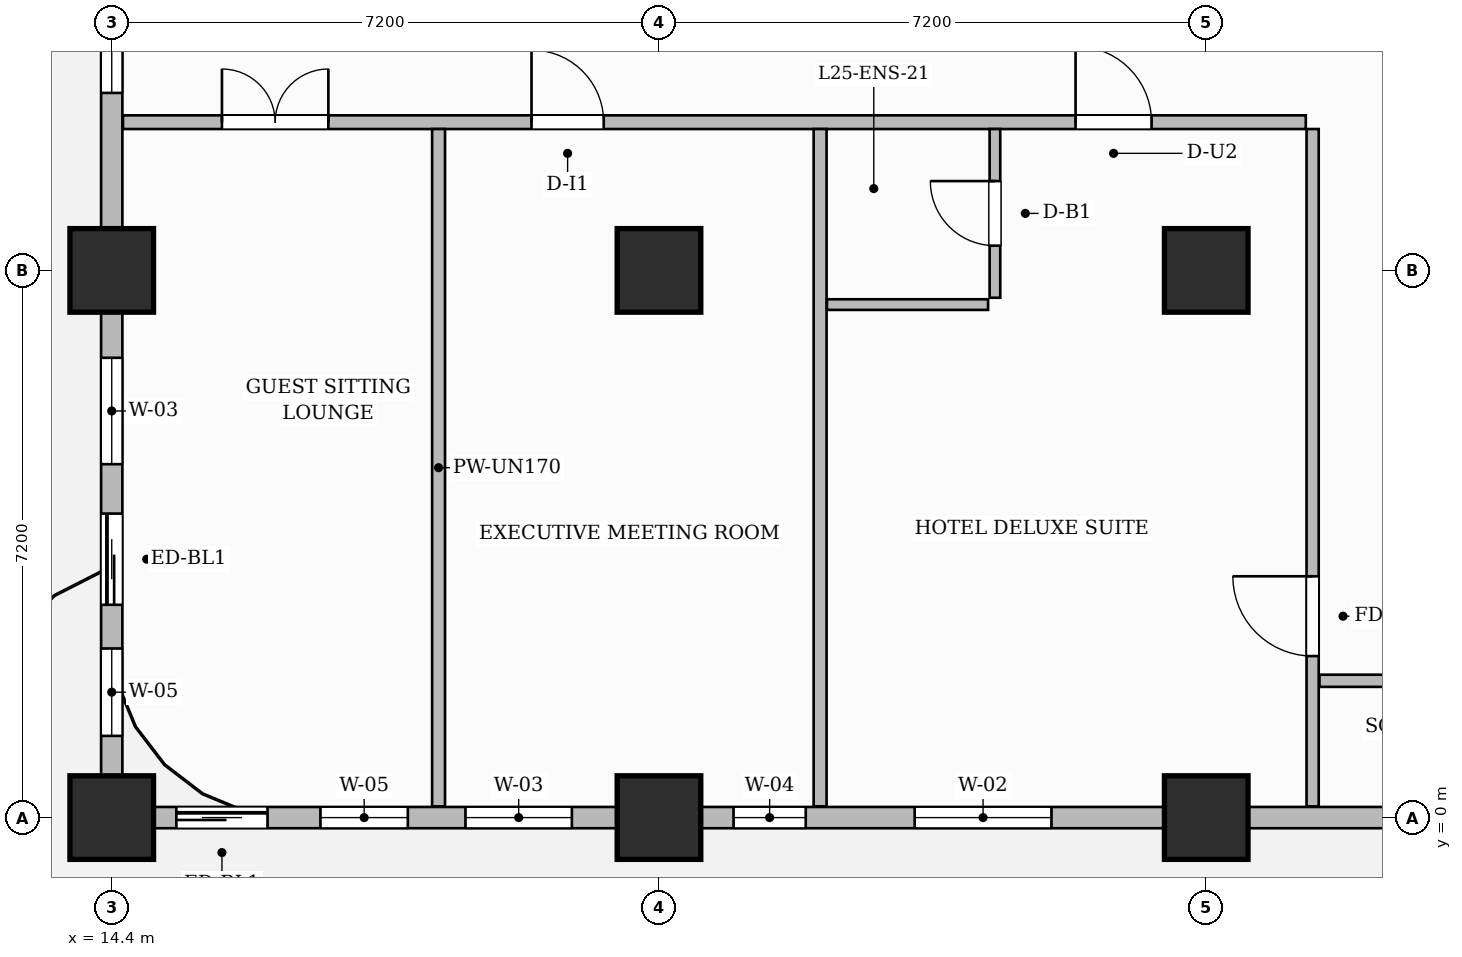
"""IFC4 building model, lengths in metres.
Left out: names, types, materials, properties, quantities, classifications, styles, units other than length and angle.
Written with IfcOpenShell. Run it as: python <this file> out.ifc"""

import sys

from ifc_helpers import new_model, si_unit, direction, frame, frame_2d, origin, origin_2d, place, context, subcontext, project, spatial, rectangle, extrude, source, transform, mapped, element, fill, save


model = new_model("IFC4")
c1 = context("Model", 3, precision=1e-05, world=origin(), true_north=direction((0.0, 1.0)))
c2 = subcontext(c1, "Body", "Model", "MODEL_VIEW")
j1 = project(units=[si_unit("LENGTHUNIT", "METRE"), si_unit("PLANEANGLEUNIT", "RADIAN")], contexts=[c1])
p1 = place(None, origin())
s1 = spatial("IfcSite", under=j1, at=p1, CompositionType="ELEMENT")
p2 = place(p1, origin())
s2 = spatial("IfcBuilding", under=s1, at=p2, CompositionType="ELEMENT")
p3 = place(p2, frame((0.0, 0.0, 102.7)))
s3 = spatial("IfcBuildingStorey", under=s2, at=p3, CompositionType="ELEMENT", Elevation=102.7)
m1 = source(origin(), c2, "Body", "SweptSolid", [
    extrude(rectangle(XDim=1.1, YDim=1.1, at=origin_2d()), origin(), (0.0, 0.0, 1.0), 3.7),
])
for number, where, z_axis, x_axis in (
    (1, (14.4, 0.0, 0.0), (0.0, 0.0, 1.0), (1.0, 0.0, 0.0)),
    (2, (14.4, 7.2, 0.0), (0.0, 0.0, 1.0), (1.0, 0.0, 0.0)),
    (3, (21.6, 0.0, 0.0), (0.0, 0.0, 1.0), (1.0, 0.0, 0.0)),
    (4, (21.6, 7.2, 0.0), (0.0, 0.0, 1.0), (1.0, 0.0, 0.0)),
    (5, (28.8, 0.0, 0.0), (0.0, 0.0, 1.0), (1.0, 0.0, 0.0)),
    (6, (28.8, 7.2, 0.0), (0.0, 0.0, 1.0), (1.0, 0.0, 0.0)),
):
    element("IfcColumn", number, at=place(p3, frame(where, z_axis=z_axis, x_axis=x_axis)), inside=s3, PredefinedType="COLUMN", context=c2, shape_type="MappedRepresentation", body=[
        mapped(m1, transform((0.0, 0.0, 0.0), scale=1.0)),
    ])
p4 = place(p3, frame((14.548, 9.15, 0.0), z_axis=(0.0, 0.0, 1.0), x_axis=(1.0, 0.0, 0.0)))
e7 = element("IfcWall", 7, at=p4, inside=s3, PredefinedType="PARTITIONING", context=c2, shape_type="SweptSolid", body=[
    extrude(rectangle(XDim=15.562, YDim=0.18, at=frame_2d((7.781, 0.0))), origin(), (0.0, 0.0, 1.0), 3.4),
])
p5 = place(p4, frame((1.302, 0.0, 0.0)))
e8 = element("IfcOpeningElement", 8, at=p5, cuts=e7, PredefinedType="OPENING", context=c2, shape_type="SweptSolid", body=[
    extrude(rectangle(XDim=1.4, YDim=2.35, at=frame_2d((0.7, 1.175))), frame((0.0, 0.1, 0.0), z_axis=(0.0, -1.0, 0.0), x_axis=(1.0, 0.0, 0.0)), (0.0, 0.0, 1.0), 0.2),
])
p6 = place(p4, frame((5.375, 0.0, 0.0)))
e9 = element("IfcOpeningElement", 9, at=p6, cuts=e7, PredefinedType="OPENING", context=c2, shape_type="SweptSolid", body=[
    extrude(rectangle(XDim=0.95, YDim=2.15, at=frame_2d((0.475, 1.075))), frame((0.0, 0.1, 0.0), z_axis=(0.0, -1.0, 0.0), x_axis=(1.0, 0.0, 0.0)), (0.0, 0.0, 1.0), 0.2),
])
p7 = place(p4, frame((12.533, 0.0, 0.0)))
e10 = element("IfcOpeningElement", 10, at=p7, cuts=e7, PredefinedType="OPENING", context=c2, shape_type="SweptSolid", body=[
    extrude(rectangle(XDim=1.0, YDim=2.2, at=frame_2d((0.5, 1.1))), frame((0.0, 0.1, 0.0), z_axis=(0.0, -1.0, 0.0), x_axis=(1.0, 0.0, 0.0)), (0.0, 0.0, 1.0), 0.2),
])
p8 = place(p3, frame((30.2, 0.148, 0.0), z_axis=(0.0, 0.0, 1.0), x_axis=(0.0, 1.0, 0.0)))
e11 = element("IfcWall", 11, at=p8, inside=s3, PredefinedType="PARTITIONING", context=c2, shape_type="SweptSolid", body=[
    extrude(rectangle(XDim=8.912, YDim=0.16, at=frame_2d((4.456, 0.0))), origin(), (0.0, 0.0, 1.0), 3.4),
])
p9 = place(p8, frame((1.977, 0.0, 0.0)))
e12 = element("IfcOpeningElement", 12, at=p9, cuts=e11, PredefinedType="OPENING", context=c2, shape_type="SweptSolid", body=[
    extrude(rectangle(XDim=1.05, YDim=2.15, at=frame_2d((0.525, 1.075))), frame((0.0, 0.09, 0.0), z_axis=(0.0, -1.0, 0.0), x_axis=(1.0, 0.0, 0.0)), (0.0, 0.0, 1.0), 0.18),
])
p10 = place(p3, frame((30.29, 1.8, 0.0), z_axis=(0.0, 0.0, 1.0), x_axis=(1.0, 0.0, 0.0)))
e13 = element("IfcWall", 13, at=p10, inside=s3, PredefinedType="PARTITIONING", context=c2, shape_type="SweptSolid", body=[
    extrude(rectangle(XDim=19.37, YDim=0.16, at=frame_2d((9.685, 0.0))), origin(), (0.0, 0.0, 1.0), 3.4),
])
p11 = place(p10, frame((5.213, 0.0, 0.0)))
e14 = element("IfcOpeningElement", 14, at=p11, cuts=e13, PredefinedType="OPENING", context=c2, shape_type="SweptSolid", body=[
    extrude(rectangle(XDim=0.9, YDim=2.15, at=frame_2d((0.45, 1.075))), frame((0.0, 0.09, 0.0), z_axis=(0.0, -1.0, 0.0), x_axis=(1.0, 0.0, 0.0)), (0.0, 0.0, 1.0), 0.18),
])
p12 = place(p10, frame((14.06, 0.0, 0.0)))
e15 = element("IfcOpeningElement", 15, at=p12, cuts=e13, PredefinedType="OPENING", context=c2, shape_type="SweptSolid", body=[
    extrude(rectangle(XDim=0.9, YDim=2.15, at=frame_2d((0.45, 1.075))), frame((0.0, 0.09, 0.0), z_axis=(0.0, -1.0, 0.0), x_axis=(1.0, 0.0, 0.0)), (0.0, 0.0, 1.0), 0.18),
])
for number, where, z_axis, x_axis in (
    (16, (18.7, 0.148, 0.0), (0.0, 0.0, 1.0), (0.0, 1.0, 0.0)),
    (17, (23.72, 0.148, 0.0), (0.0, 0.0, 1.0), (0.0, 1.0, 0.0)),
):
    element("IfcWall", number, at=place(p3, frame(where, z_axis=z_axis, x_axis=x_axis)), inside=s3, PredefinedType="PARTITIONING", context=c2, shape_type="SweptSolid", body=[
        extrude(rectangle(XDim=8.912, YDim=0.17, at=frame_2d((4.456, 0.0))), origin(), (0.0, 0.0, 1.0), 3.4),
    ])
p13 = place(p3, frame((26.02, 6.84, 0.0), z_axis=(0.0, 0.0, 1.0), x_axis=(0.0, 1.0, 0.0)))
e18 = element("IfcWall", 18, at=p13, inside=s3, PredefinedType="PARTITIONING", context=c2, shape_type="SweptSolid", body=[
    extrude(rectangle(XDim=2.22, YDim=0.14, at=frame_2d((1.11, 0.0))), origin(), (0.0, 0.0, 1.0), 3.4),
])
p14 = place(p13, frame((0.685, 0.0, 0.0)))
e19 = element("IfcOpeningElement", 19, at=p14, cuts=e18, PredefinedType="OPENING", context=c2, shape_type="SweptSolid", body=[
    extrude(rectangle(XDim=0.85, YDim=2.1, at=frame_2d((0.425, 1.05))), frame((0.0, 0.08, 0.0), z_axis=(0.0, -1.0, 0.0), x_axis=(1.0, 0.0, 0.0)), (0.0, 0.0, 1.0), 0.16),
])
p15 = place(p3, frame((23.81, 6.75, 0.0), z_axis=(0.0, 0.0, 1.0), x_axis=(1.0, 0.0, 0.0)))
e20 = element("IfcWall", 20, at=p15, inside=s3, PredefinedType="PARTITIONING", context=c2, shape_type="SweptSolid", body=[
    extrude(rectangle(XDim=2.12, YDim=0.14, at=frame_2d((1.06, 0.0))), origin(), (0.0, 0.0, 1.0), 3.4),
])
p16 = place(p3, frame((14.4, 0.0, 0.0), z_axis=(0.0, 0.0, 1.0), x_axis=(1.0, 0.0, 0.0)))
e21 = element("IfcWall", 21, at=p16, inside=s3, PredefinedType="SOLIDWALL", context=c2, shape_type="SweptSolid", body=[
    extrude(rectangle(XDim=43.2, YDim=0.28, at=frame_2d((21.6, 0.0))), origin(), (0.0, 0.0, 1.0), 2.835),
])
p17 = place(p16, frame((0.85, 0.0, 0.0)))
e22 = element("IfcOpeningElement", 22, at=p17, cuts=e21, PredefinedType="OPENING", context=c2, shape_type="SweptSolid", body=[
    extrude(rectangle(XDim=1.2, YDim=2.2, at=frame_2d((0.6, 1.1))), frame((0.0, 0.15, 0.0), z_axis=(0.0, -1.0, 0.0), x_axis=(1.0, 0.0, 0.0)), (0.0, 0.0, 1.0), 0.3),
])
p18 = place(p16, frame((2.746, 0.0, 0.8)))
e23 = element("IfcOpeningElement", 23, at=p18, cuts=e21, PredefinedType="OPENING", context=c2, shape_type="SweptSolid", body=[
    extrude(rectangle(XDim=1.15, YDim=1.8, at=frame_2d((0.575, 0.9))), frame((0.0, 0.15, 0.0), z_axis=(0.0, -1.0, 0.0), x_axis=(1.0, 0.0, 0.0)), (0.0, 0.0, 1.0), 0.3),
])
p19 = place(p16, frame((4.654, 0.0, 0.8)))
e24 = element("IfcOpeningElement", 24, at=p19, cuts=e21, PredefinedType="OPENING", context=c2, shape_type="SweptSolid", body=[
    extrude(rectangle(XDim=1.4, YDim=1.85, at=frame_2d((0.7, 0.925))), frame((0.0, 0.15, 0.0), z_axis=(0.0, -1.0, 0.0), x_axis=(1.0, 0.0, 0.0)), (0.0, 0.0, 1.0), 0.3),
])
p20 = place(p16, frame((8.181, 0.0, 0.8)))
e25 = element("IfcOpeningElement", 25, at=p20, cuts=e21, PredefinedType="OPENING", context=c2, shape_type="SweptSolid", body=[
    extrude(rectangle(XDim=0.95, YDim=1.75, at=frame_2d((0.475, 0.875))), frame((0.0, 0.15, 0.0), z_axis=(0.0, -1.0, 0.0), x_axis=(1.0, 0.0, 0.0)), (0.0, 0.0, 1.0), 0.3),
])
p21 = place(p16, frame((10.564, 0.0, 0.8)))
e26 = element("IfcOpeningElement", 26, at=p21, cuts=e21, PredefinedType="OPENING", context=c2, shape_type="SweptSolid", body=[
    extrude(rectangle(XDim=1.8, YDim=1.85, at=frame_2d((0.9, 0.925))), frame((0.0, 0.15, 0.0), z_axis=(0.0, -1.0, 0.0), x_axis=(1.0, 0.0, 0.0)), (0.0, 0.0, 1.0), 0.3),
])
p22 = place(p16, frame((16.804, 0.0, 0.8)))
e27 = element("IfcOpeningElement", 27, at=p22, cuts=e21, PredefinedType="OPENING", context=c2, shape_type="SweptSolid", body=[
    extrude(rectangle(XDim=1.8, YDim=1.85, at=frame_2d((0.9, 0.925))), frame((0.0, 0.15, 0.0), z_axis=(0.0, -1.0, 0.0), x_axis=(1.0, 0.0, 0.0)), (0.0, 0.0, 1.0), 0.3),
])
p23 = place(p16, frame((22.396, 0.0, 0.8)))
e28 = element("IfcOpeningElement", 28, at=p23, cuts=e21, PredefinedType="OPENING", context=c2, shape_type="SweptSolid", body=[
    extrude(rectangle(XDim=1.8, YDim=1.85, at=frame_2d((0.9, 0.925))), frame((0.0, 0.15, 0.0), z_axis=(0.0, -1.0, 0.0), x_axis=(1.0, 0.0, 0.0)), (0.0, 0.0, 1.0), 0.3),
])
p24 = place(p16, frame((25.629, 0.0, 0.8)))
e29 = element("IfcOpeningElement", 29, at=p24, cuts=e21, PredefinedType="OPENING", context=c2, shape_type="SweptSolid", body=[
    extrude(rectangle(XDim=0.95, YDim=1.75, at=frame_2d((0.475, 0.875))), frame((0.0, 0.15, 0.0), z_axis=(0.0, -1.0, 0.0), x_axis=(1.0, 0.0, 0.0)), (0.0, 0.0, 1.0), 0.3),
])
p25 = place(p16, frame((29.075, 0.0, 0.8)))
e30 = element("IfcOpeningElement", 30, at=p25, cuts=e21, PredefinedType="OPENING", context=c2, shape_type="SweptSolid", body=[
    extrude(rectangle(XDim=1.8, YDim=1.85, at=frame_2d((0.9, 0.925))), frame((0.0, 0.15, 0.0), z_axis=(0.0, -1.0, 0.0), x_axis=(1.0, 0.0, 0.0)), (0.0, 0.0, 1.0), 0.3),
])
p26 = place(p16, frame((32.125, 0.0, 0.8)))
e31 = element("IfcOpeningElement", 31, at=p26, cuts=e21, PredefinedType="OPENING", context=c2, shape_type="SweptSolid", body=[
    extrude(rectangle(XDim=1.8, YDim=1.85, at=frame_2d((0.9, 0.925))), frame((0.0, 0.15, 0.0), z_axis=(0.0, -1.0, 0.0), x_axis=(1.0, 0.0, 0.0)), (0.0, 0.0, 1.0), 0.3),
])
p27 = place(p16, frame((36.946, 0.0, 0.8)))
e32 = element("IfcOpeningElement", 32, at=p27, cuts=e21, PredefinedType="OPENING", context=c2, shape_type="SweptSolid", body=[
    extrude(rectangle(XDim=1.8, YDim=1.85, at=frame_2d((0.9, 0.925))), frame((0.0, 0.15, 0.0), z_axis=(0.0, -1.0, 0.0), x_axis=(1.0, 0.0, 0.0)), (0.0, 0.0, 1.0), 0.3),
])
p28 = place(p16, frame((40.054, 0.0, 0.8)))
e33 = element("IfcOpeningElement", 33, at=p28, cuts=e21, PredefinedType="OPENING", context=c2, shape_type="SweptSolid", body=[
    extrude(rectangle(XDim=1.8, YDim=1.85, at=frame_2d((0.9, 0.925))), frame((0.0, 0.15, 0.0), z_axis=(0.0, -1.0, 0.0), x_axis=(1.0, 0.0, 0.0)), (0.0, 0.0, 1.0), 0.3),
])
p29 = place(p3, frame((14.4, 0.05, 0.0), z_axis=(0.0, 0.0, 1.0), x_axis=(0.0, 1.0, 0.0)))
e34 = element("IfcWall", 34, at=p29, inside=s3, PredefinedType="SOLIDWALL", context=c2, shape_type="SweptSolid", body=[
    extrude(rectangle(XDim=20.6, YDim=0.28, at=frame_2d((10.3, 0.0))), origin(), (0.0, 0.0, 1.0), 2.835),
])
p30 = place(p29, frame((2.75, 0.0, 0.0)))
e35 = element("IfcOpeningElement", 35, at=p30, cuts=e34, PredefinedType="OPENING", context=c2, shape_type="SweptSolid", body=[
    extrude(rectangle(XDim=1.2, YDim=2.2, at=frame_2d((0.6, 1.1))), frame((0.0, 0.15, 0.0), z_axis=(0.0, -1.0, 0.0), x_axis=(1.0, 0.0, 0.0)), (0.0, 0.0, 1.0), 0.3),
])
p31 = place(p29, frame((1.025, 0.0, 0.8)))
e36 = element("IfcOpeningElement", 36, at=p31, cuts=e34, PredefinedType="OPENING", context=c2, shape_type="SweptSolid", body=[
    extrude(rectangle(XDim=1.15, YDim=1.8, at=frame_2d((0.575, 0.9))), frame((0.0, 0.15, 0.0), z_axis=(0.0, -1.0, 0.0), x_axis=(1.0, 0.0, 0.0)), (0.0, 0.0, 1.0), 0.3),
])
p32 = place(p29, frame((4.6, 0.0, 0.8)))
e37 = element("IfcOpeningElement", 37, at=p32, cuts=e34, PredefinedType="OPENING", context=c2, shape_type="SweptSolid", body=[
    extrude(rectangle(XDim=1.4, YDim=1.85, at=frame_2d((0.7, 0.925))), frame((0.0, 0.15, 0.0), z_axis=(0.0, -1.0, 0.0), x_axis=(1.0, 0.0, 0.0)), (0.0, 0.0, 1.0), 0.3),
])
p33 = place(p29, frame((9.485, 0.0, 0.8)))
e38 = element("IfcOpeningElement", 38, at=p33, cuts=e34, PredefinedType="OPENING", context=c2, shape_type="SweptSolid", body=[
    extrude(rectangle(XDim=1.15, YDim=1.8, at=frame_2d((0.575, 0.9))), frame((0.0, 0.15, 0.0), z_axis=(0.0, -1.0, 0.0), x_axis=(1.0, 0.0, 0.0)), (0.0, 0.0, 1.0), 0.3),
])
p34 = place(p29, frame((11.389, 0.0, 0.8)))
e39 = element("IfcOpeningElement", 39, at=p34, cuts=e34, PredefinedType="OPENING", context=c2, shape_type="SweptSolid", body=[
    extrude(rectangle(XDim=1.8, YDim=1.85, at=frame_2d((0.9, 0.925))), frame((0.0, 0.15, 0.0), z_axis=(0.0, -1.0, 0.0), x_axis=(1.0, 0.0, 0.0)), (0.0, 0.0, 1.0), 0.3),
])
p35 = place(p29, frame((16.79, 0.0, 0.8)))
e40 = element("IfcOpeningElement", 40, at=p35, cuts=e34, PredefinedType="OPENING", context=c2, shape_type="SweptSolid", body=[
    extrude(rectangle(XDim=1.8, YDim=1.85, at=frame_2d((0.9, 0.925))), frame((0.0, 0.15, 0.0), z_axis=(0.0, -1.0, 0.0), x_axis=(1.0, 0.0, 0.0)), (0.0, 0.0, 1.0), 0.3),
])
m2 = source(origin(), c2, "Body", "SweptSolid", [
    extrude(rectangle(XDim=1.05, YDim=2.15, at=frame_2d((0.525, 1.075))), frame((0.0, 0.025, 0.0), z_axis=(0.0, -1.0, 0.0), x_axis=(1.0, 0.0, 0.0)), (0.0, 0.0, 1.0), 0.05),
])
p36 = place(p9, origin())
e41 = element("IfcDoor", 41, at=p36, inside=s3, OperationType="SINGLE_SWING_RIGHT", PredefinedType="DOOR", context=c2, shape_type="MappedRepresentation", body=[
    mapped(m2, transform((0.0, 0.0, 0.0), scale=1.0)),
])
fill(e12, e41)
m3 = source(origin(), c2, "Body", "SweptSolid", [
    extrude(rectangle(XDim=1.4, YDim=2.35, at=frame_2d((0.7, 1.175))), frame((0.0, 0.025, 0.0), z_axis=(0.0, -1.0, 0.0), x_axis=(1.0, 0.0, 0.0)), (0.0, 0.0, 1.0), 0.05),
])
p37 = place(p5, origin())
e42 = element("IfcDoor", 42, at=p37, inside=s3, OperationType="DOUBLE_DOOR_SINGLE_SWING", PredefinedType="DOOR", context=c2, shape_type="MappedRepresentation", body=[
    mapped(m3, transform((0.0, 0.0, 0.0), scale=1.0)),
])
fill(e8, e42)
m4 = source(origin(), c2, "Body", "SweptSolid", [
    extrude(rectangle(XDim=0.95, YDim=2.15, at=frame_2d((0.475, 1.075))), frame((0.0, 0.025, 0.0), z_axis=(0.0, -1.0, 0.0), x_axis=(1.0, 0.0, 0.0)), (0.0, 0.0, 1.0), 0.05),
])
p38 = place(p6, origin())
e43 = element("IfcDoor", 43, at=p38, inside=s3, OperationType="SINGLE_SWING_LEFT", PredefinedType="DOOR", context=c2, shape_type="MappedRepresentation", body=[
    mapped(m4, transform((0.0, 0.0, 0.0), scale=1.0)),
])
fill(e9, e43)
m5 = source(origin(), c2, "Body", "SweptSolid", [
    extrude(rectangle(XDim=0.85, YDim=2.1, at=frame_2d((0.425, 1.05))), frame((0.0, 0.025, 0.0), z_axis=(0.0, -1.0, 0.0), x_axis=(1.0, 0.0, 0.0)), (0.0, 0.0, 1.0), 0.05),
])
p39 = place(p14, origin())
e44 = element("IfcDoor", 44, at=p39, inside=s3, OperationType="SINGLE_SWING_RIGHT", PredefinedType="DOOR", context=c2, shape_type="MappedRepresentation", body=[
    mapped(m5, transform((0.0, 0.0, 0.0), scale=1.0)),
])
fill(e19, e44)
m6 = source(origin(), c2, "Body", "SweptSolid", [
    extrude(rectangle(XDim=1.0, YDim=2.2, at=frame_2d((0.5, 1.1))), frame((0.0, 0.025, 0.0), z_axis=(0.0, -1.0, 0.0), x_axis=(1.0, 0.0, 0.0)), (0.0, 0.0, 1.0), 0.05),
])
p40 = place(p7, origin())
e45 = element("IfcDoor", 45, at=p40, inside=s3, OperationType="SINGLE_SWING_LEFT", PredefinedType="DOOR", context=c2, shape_type="MappedRepresentation", body=[
    mapped(m6, transform((0.0, 0.0, 0.0), scale=1.0)),
])
fill(e10, e45)
m7 = source(origin(), c2, "Body", "SweptSolid", [
    extrude(rectangle(XDim=1.2, YDim=2.2, at=frame_2d((0.6, 1.1))), frame((0.0, 0.025, 0.0), z_axis=(0.0, -1.0, 0.0), x_axis=(1.0, 0.0, 0.0)), (0.0, 0.0, 1.0), 0.05),
])
p41 = place(p17, origin())
e46 = element("IfcDoor", 46, at=p41, inside=s3, OperationType="SLIDING_TO_LEFT", PredefinedType="DOOR", context=c2, shape_type="MappedRepresentation", body=[
    mapped(m7, transform((0.0, 0.0, 0.0), scale=1.0)),
])
fill(e22, e46)
p42 = place(p30, origin())
e47 = element("IfcDoor", 47, at=p42, inside=s3, OperationType="SLIDING_TO_LEFT", PredefinedType="DOOR", context=c2, shape_type="MappedRepresentation", body=[
    mapped(m7, transform((0.0, 0.0, 0.0), scale=1.0)),
])
fill(e35, e47)
m8 = source(origin(), c2, "Body", "SweptSolid", [
    extrude(rectangle(XDim=1.15, YDim=1.8, at=frame_2d((0.575, 0.9))), frame((0.0, 0.03, 0.0), z_axis=(0.0, -1.0, 0.0), x_axis=(1.0, 0.0, 0.0)), (0.0, 0.0, 1.0), 0.06),
])
p43 = place(p18, origin())
e48 = element("IfcWindow", 48, at=p43, inside=s3, PartitioningType="SINGLE_PANEL", PredefinedType="WINDOW", context=c2, shape_type="MappedRepresentation", body=[
    mapped(m8, transform((0.0, 0.0, 0.0), scale=1.0)),
])
fill(e23, e48)
m9 = source(origin(), c2, "Body", "SweptSolid", [
    extrude(rectangle(XDim=1.4, YDim=1.85, at=frame_2d((0.7, 0.925))), frame((0.0, 0.03, 0.0), z_axis=(0.0, -1.0, 0.0), x_axis=(1.0, 0.0, 0.0)), (0.0, 0.0, 1.0), 0.06),
])
p44 = place(p19, origin())
e49 = element("IfcWindow", 49, at=p44, inside=s3, PartitioningType="SINGLE_PANEL", PredefinedType="WINDOW", context=c2, shape_type="MappedRepresentation", body=[
    mapped(m9, transform((0.0, 0.0, 0.0), scale=1.0)),
])
fill(e24, e49)
m10 = source(origin(), c2, "Body", "SweptSolid", [
    extrude(rectangle(XDim=0.95, YDim=1.75, at=frame_2d((0.475, 0.875))), frame((0.0, 0.03, 0.0), z_axis=(0.0, -1.0, 0.0), x_axis=(1.0, 0.0, 0.0)), (0.0, 0.0, 1.0), 0.06),
])
p45 = place(p20, origin())
e50 = element("IfcWindow", 50, at=p45, inside=s3, PartitioningType="SINGLE_PANEL", PredefinedType="WINDOW", context=c2, shape_type="MappedRepresentation", body=[
    mapped(m10, transform((0.0, 0.0, 0.0), scale=1.0)),
])
fill(e25, e50)
m11 = source(origin(), c2, "Body", "SweptSolid", [
    extrude(rectangle(XDim=1.8, YDim=1.85, at=frame_2d((0.9, 0.925))), frame((0.0, 0.03, 0.0), z_axis=(0.0, -1.0, 0.0), x_axis=(1.0, 0.0, 0.0)), (0.0, 0.0, 1.0), 0.06),
])
p46 = place(p21, origin())
e51 = element("IfcWindow", 51, at=p46, inside=s3, PartitioningType="DOUBLE_PANEL_VERTICAL", PredefinedType="WINDOW", context=c2, shape_type="MappedRepresentation", body=[
    mapped(m11, transform((0.0, 0.0, 0.0), scale=1.0)),
])
fill(e26, e51)
p47 = place(p31, origin())
e52 = element("IfcWindow", 52, at=p47, inside=s3, PartitioningType="SINGLE_PANEL", PredefinedType="WINDOW", context=c2, shape_type="MappedRepresentation", body=[
    mapped(m8, transform((0.0, 0.0, 0.0), scale=1.0)),
])
fill(e36, e52)
p48 = place(p32, origin())
e53 = element("IfcWindow", 53, at=p48, inside=s3, PartitioningType="SINGLE_PANEL", PredefinedType="WINDOW", context=c2, shape_type="MappedRepresentation", body=[
    mapped(m9, transform((0.0, 0.0, 0.0), scale=1.0)),
])
fill(e37, e53)
p49 = place(p33, origin())
e54 = element("IfcWindow", 54, at=p49, inside=s3, PartitioningType="SINGLE_PANEL", PredefinedType="WINDOW", context=c2, shape_type="MappedRepresentation", body=[
    mapped(m8, transform((0.0, 0.0, 0.0), scale=1.0)),
])
fill(e38, e54)
save(model, sys.argv[1])
